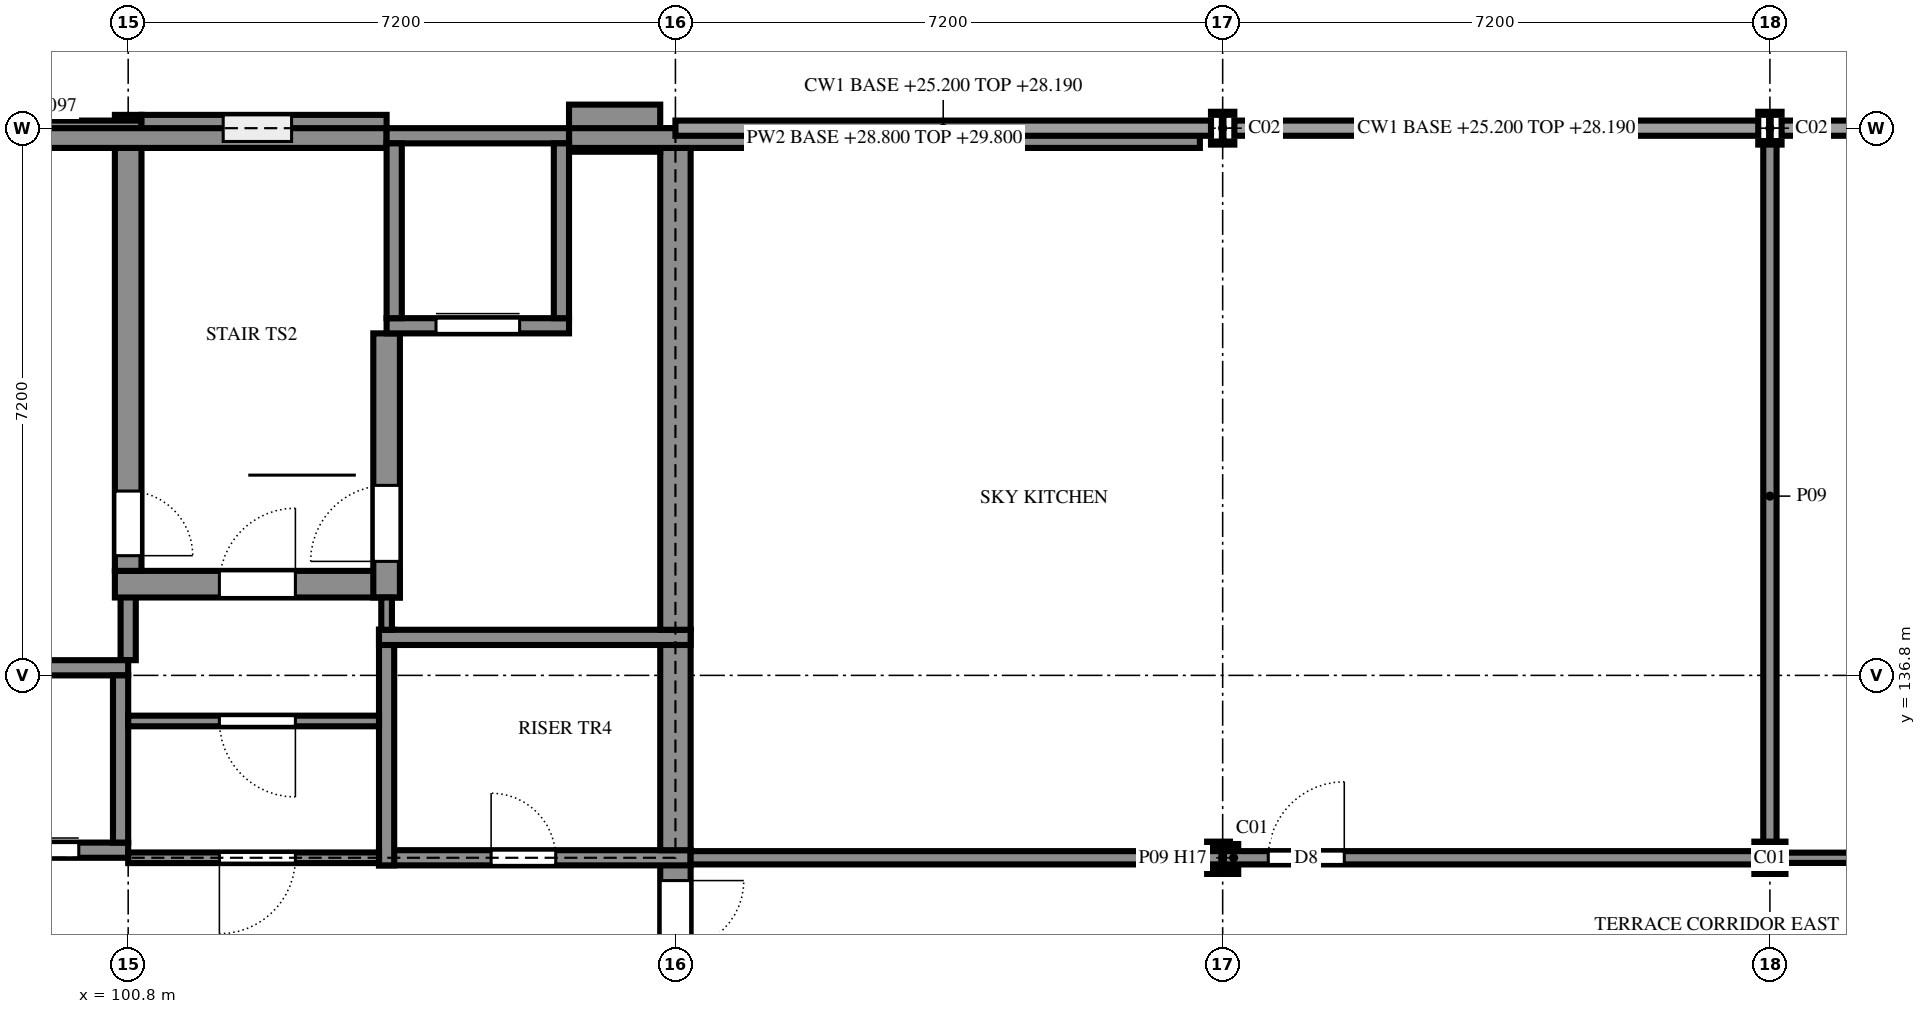
"""IFC4 building model, lengths in metres.
Left out: names, types, materials, properties, quantities, classifications, styles, units other than length and angle.
Written with IfcOpenShell. Run it as: python <this file> out.ifc"""

import sys

from ifc_helpers import new_model, si_unit, direction, frame, frame_2d, origin, origin_2d, place, context, subcontext, project, spatial, rectangle, i_section, extrude, element, fill, save


model = new_model("IFC4")
c1 = context("Model", 3, precision=1e-05, world=origin(), true_north=direction((0.0, 1.0)))
c2 = subcontext(c1, "Body", "Model", "MODEL_VIEW")
j1 = project(units=[si_unit("LENGTHUNIT", "METRE"), si_unit("PLANEANGLEUNIT", "RADIAN")], contexts=[c1])
p1 = place(None, origin())
s1 = spatial("IfcSite", under=j1, at=p1, CompositionType="ELEMENT")
p2 = place(p1, origin())
s2 = spatial("IfcBuilding", under=s1, at=p2, CompositionType="ELEMENT")
p3 = place(p2, frame((0.0, 0.0, 25.2)))
s3 = spatial("IfcBuildingStorey", under=s2, at=p3, CompositionType="ELEMENT", Elevation=25.2)
p4 = place(p3, frame((115.2, 134.4, 0.0), z_axis=(0.0, 0.0, 1.0), x_axis=(1.0, 0.0, 0.0)))
e1 = element("IfcColumn", 1, at=p4, inside=s3, PredefinedType="COLUMN", context=c2, shape_type="SweptSolid", body=[
    extrude(i_section(OverallWidth=0.409, OverallDepth=0.425, WebThickness=0.033, FlangeThickness=0.052, FilletRadius=0.015, at=origin_2d()), origin(), (0.0, 0.0, 1.0), 3.6),
])
p5 = place(p3, frame((115.2, 144.0, 0.0), z_axis=(0.0, 0.0, 1.0), x_axis=(1.0, 0.0, 0.0)))
e2 = element("IfcColumn", 2, at=p5, inside=s3, PredefinedType="COLUMN", context=c2, shape_type="SweptSolid", body=[
    extrude(i_section(OverallWidth=0.307, OverallDepth=0.432, WebThickness=0.021, FlangeThickness=0.04, FilletRadius=0.027, at=origin_2d()), origin(), (0.0, 0.0, 1.0), 3.6),
])
p6 = place(p3, frame((122.4, 134.4, 0.0), z_axis=(0.0, 0.0, 1.0), x_axis=(1.0, 0.0, 0.0)))
e3 = element("IfcColumn", 3, at=p6, inside=s3, PredefinedType="COLUMN", context=c2, shape_type="SweptSolid", body=[
    extrude(i_section(OverallWidth=0.409, OverallDepth=0.425, WebThickness=0.033, FlangeThickness=0.052, FilletRadius=0.015, at=origin_2d()), origin(), (0.0, 0.0, 1.0), 3.6),
])
p7 = place(p3, frame((122.4, 144.0, 0.0), z_axis=(0.0, 0.0, 1.0), x_axis=(1.0, 0.0, 0.0)))
e4 = element("IfcColumn", 4, at=p7, inside=s3, PredefinedType="COLUMN", context=c2, shape_type="SweptSolid", body=[
    extrude(i_section(OverallWidth=0.307, OverallDepth=0.432, WebThickness=0.021, FlangeThickness=0.04, FilletRadius=0.027, at=origin_2d()), origin(), (0.0, 0.0, 1.0), 3.6),
])
p8 = place(p3, frame((108.0, 132.0, 0.0), z_axis=(0.0, 0.0, 1.0), x_axis=(0.0, 1.0, 0.0)))
e5 = element("IfcWall", 5, at=p8, inside=s3, PredefinedType="SHEAR", context=c2, shape_type="SweptSolid", body=[
    extrude(rectangle(XDim=2.5, YDim=0.4, at=frame_2d((1.25, 0.0))), origin(), (0.0, 0.0, 1.0), 3.6),
])
p9 = place(p8, frame((0.3, 0.0, 0.0)))
e6 = element("IfcOpeningElement", 6, at=p9, cuts=e5, PredefinedType="OPENING", context=c2, shape_type="SweptSolid", body=[
    extrude(rectangle(XDim=1.8, YDim=2.1, at=frame_2d((0.9, 1.05))), frame((0.0, 0.21, 0.0), z_axis=(0.0, -1.0, 0.0), x_axis=(1.0, 0.0, 0.0)), (0.0, 0.0, 1.0), 0.42),
])
p10 = place(p3, frame((104.1, 134.4, 0.0), z_axis=(0.0, 0.0, 1.0), x_axis=(1.0, 0.0, 0.0)))
e7 = element("IfcWall", 7, at=p10, inside=s3, PredefinedType="SHEAR", context=c2, shape_type="SweptSolid", body=[
    extrude(rectangle(XDim=4.1, YDim=0.2, at=frame_2d((2.05, 0.0))), origin(), (0.0, 0.0, 1.0), 3.6),
])
p11 = place(p10, frame((1.475, 0.0, 0.0)))
e8 = element("IfcOpeningElement", 8, at=p11, cuts=e7, PredefinedType="OPENING", context=c2, shape_type="SweptSolid", body=[
    extrude(rectangle(XDim=0.85, YDim=2.1, at=frame_2d((0.425, 1.05))), frame((0.0, 0.11, 0.0), z_axis=(0.0, -1.0, 0.0), x_axis=(1.0, 0.0, 0.0)), (0.0, 0.0, 1.0), 0.22),
])
p12 = place(p3, frame((108.0, 134.5, 0.0), z_axis=(0.0, 0.0, 1.0), x_axis=(0.0, 1.0, 0.0)))
e9 = element("IfcWall", 9, at=p12, inside=s3, PredefinedType="SHEAR", context=c2, shape_type="SweptSolid", body=[
    extrude(rectangle(XDim=2.9, YDim=0.4, at=frame_2d((1.45, 0.0))), origin(), (0.0, 0.0, 1.0), 3.6),
])
p13 = place(p3, frame((100.8, 137.0, 0.0), z_axis=(0.0, 0.0, 1.0), x_axis=(0.0, 1.0, 0.0)))
e10 = element("IfcWall", 10, at=p13, inside=s3, PredefinedType="SHEAR", context=c2, shape_type="SweptSolid", body=[
    extrude(rectangle(XDim=1.175, YDim=0.2, at=frame_2d((0.587, 0.0))), origin(), (0.0, 0.0, 1.0), 3.6),
])
p14 = place(p3, frame((104.2, 137.4, 0.0), z_axis=(0.0, 0.0, 1.0), x_axis=(0.0, -1.0, 0.0)))
e11 = element("IfcWall", 11, at=p14, inside=s3, PredefinedType="SHEAR", context=c2, shape_type="SweptSolid", body=[
    extrude(rectangle(XDim=3.1, YDim=0.2, at=frame_2d((1.55, 0.0))), origin(), (0.0, 0.0, 1.0), 3.6),
])
p15 = place(p3, frame((108.2, 137.3, 0.0), z_axis=(0.0, 0.0, 1.0), x_axis=(-1.0, 0.0, 0.0)))
e12 = element("IfcWall", 12, at=p15, inside=s3, PredefinedType="SHEAR", context=c2, shape_type="SweptSolid", body=[
    extrude(rectangle(XDim=4.1, YDim=0.2, at=frame_2d((2.05, 0.0))), origin(), (0.0, 0.0, 1.0), 3.6),
])
p16 = place(p3, frame((108.0, 137.4, 0.0), z_axis=(0.0, 0.0, 1.0), x_axis=(0.0, 1.0, 0.0)))
e13 = element("IfcWall", 13, at=p16, inside=s3, PredefinedType="SHEAR", context=c2, shape_type="SweptSolid", body=[
    extrude(rectangle(XDim=6.6, YDim=0.4, at=frame_2d((3.3, 0.0))), origin(), (0.0, 0.0, 1.0), 3.6),
])
p17 = place(p3, frame((100.625, 138.0, 0.0), z_axis=(0.0, 0.0, 1.0), x_axis=(1.0, 0.0, 0.0)))
e14 = element("IfcWall", 14, at=p17, inside=s3, PredefinedType="SHEAR", context=c2, shape_type="SweptSolid", body=[
    extrude(rectangle(XDim=3.75, YDim=0.35, at=frame_2d((1.875, 0.0))), origin(), (0.0, 0.0, 1.0), 3.6),
])
p18 = place(p17, frame((1.375, 0.0, 0.0)))
e15 = element("IfcOpeningElement", 15, at=p18, cuts=e14, PredefinedType="OPENING", context=c2, shape_type="SweptSolid", body=[
    extrude(rectangle(XDim=1.0, YDim=2.1, at=frame_2d((0.5, 1.05))), frame((0.0, 0.185, 0.0), z_axis=(0.0, -1.0, 0.0), x_axis=(1.0, 0.0, 0.0)), (0.0, 0.0, 1.0), 0.37),
])
p19 = place(p3, frame((104.2, 137.825, 0.0), z_axis=(0.0, 0.0, 1.0), x_axis=(0.0, 1.0, 0.0)))
e16 = element("IfcWall", 16, at=p19, inside=s3, PredefinedType="SHEAR", context=c2, shape_type="SweptSolid", body=[
    extrude(rectangle(XDim=3.475, YDim=0.35, at=frame_2d((1.738, 0.0))), origin(), (0.0, 0.0, 1.0), 3.6),
])
p20 = place(p19, frame((0.475, 0.0, 0.0)))
e17 = element("IfcOpeningElement", 17, at=p20, cuts=e16, PredefinedType="OPENING", context=c2, shape_type="SweptSolid", body=[
    extrude(rectangle(XDim=1.0, YDim=2.1, at=frame_2d((0.5, 1.05))), frame((0.0, 0.185, 0.0), z_axis=(0.0, -1.0, 0.0), x_axis=(1.0, 0.0, 0.0)), (0.0, 0.0, 1.0), 0.37),
])
p21 = place(p3, frame((100.8, 144.175, 0.0), z_axis=(0.0, 0.0, 1.0), x_axis=(0.0, -1.0, 0.0)))
e18 = element("IfcWall", 18, at=p21, inside=s3, PredefinedType="SHEAR", context=c2, shape_type="SweptSolid", body=[
    extrude(rectangle(XDim=6.0, YDim=0.35, at=frame_2d((3.0, 0.0))), origin(), (0.0, 0.0, 1.0), 3.6),
])
p22 = place(p21, frame((4.95, 0.0, 0.0)))
e19 = element("IfcOpeningElement", 19, at=p22, cuts=e18, PredefinedType="OPENING", context=c2, shape_type="SweptSolid", body=[
    extrude(rectangle(XDim=0.85, YDim=2.1, at=frame_2d((0.425, 1.05))), frame((0.0, 0.185, 0.0), z_axis=(0.0, -1.0, 0.0), x_axis=(1.0, 0.0, 0.0)), (0.0, 0.0, 1.0), 0.37),
])
p23 = place(p3, frame((100.975, 144.0, 0.0), z_axis=(0.0, 0.0, 1.0), x_axis=(-1.0, 0.0, 0.0)))
e20 = element("IfcWall", 20, at=p23, inside=s3, PredefinedType="SHEAR", context=c2, shape_type="SweptSolid", body=[
    extrude(rectangle(XDim=7.575, YDim=0.2, at=frame_2d((3.788, 0.0))), origin(), (0.0, 0.0, 1.0), 3.6),
])
p24 = place(p3, frame((104.2, 144.0, 0.0), z_axis=(0.0, 0.0, 1.0), x_axis=(-1.0, 0.0, 0.0)))
e21 = element("IfcWall", 21, at=p24, inside=s3, PredefinedType="SHEAR", context=c2, shape_type="SweptSolid", body=[
    extrude(rectangle(XDim=3.225, YDim=0.35, at=frame_2d((1.612, 0.0))), origin(), (0.0, 0.0, 1.0), 3.6),
])
p25 = place(p24, frame((1.25, 0.0, 0.6)))
e22 = element("IfcOpeningElement", 22, at=p25, cuts=e21, PredefinedType="OPENING", context=c2, shape_type="SweptSolid", body=[
    extrude(rectangle(XDim=0.9, YDim=2.1, at=frame_2d((0.45, 1.05))), frame((0.0, 0.185, 0.0), z_axis=(0.0, -1.0, 0.0), x_axis=(1.0, 0.0, 0.0)), (0.0, 0.0, 1.0), 0.37),
])
p26 = place(p3, frame((107.8, 144.0, 0.0), z_axis=(0.0, 0.0, 1.0), x_axis=(-1.0, 0.0, 0.0)))
e23 = element("IfcWall", 23, at=p26, inside=s3, PredefinedType="SOLIDWALL", context=c2, shape_type="SweptSolid", body=[
    extrude(rectangle(XDim=1.2, YDim=0.62, at=frame_2d((0.6, 0.0))), origin(), (0.0, 0.0, 1.0), 3.29),
])
p27 = place(p3, frame((86.7, 143.87, 3.6), z_axis=(0.0, 0.0, 1.0), x_axis=(1.0, 0.0, 0.0)))
e24 = element("IfcWall", 24, at=p27, inside=s3, PredefinedType="PARAPET", context=c2, shape_type="SweptSolid", body=[
    extrude(rectangle(XDim=17.5, YDim=0.26, at=frame_2d((8.75, 0.0))), origin(), (0.0, 0.0, 1.0), 1.0),
])
p28 = place(p3, frame((106.6, 143.87, 3.6), z_axis=(0.0, 0.0, 1.0), x_axis=(1.0, 0.0, 0.0)))
e25 = element("IfcWall", 25, at=p28, inside=s3, PredefinedType="PARAPET", context=c2, shape_type="SweptSolid", body=[
    extrude(rectangle(XDim=8.3, YDim=0.26, at=frame_2d((4.15, 0.0))), origin(), (0.0, 0.0, 1.0), 1.0),
])
p29 = place(p3, frame((98.4, 134.5, 0.0), z_axis=(0.0, 0.0, 1.0), x_axis=(1.0, 0.0, 0.0)))
e26 = element("IfcWall", 26, at=p29, inside=s3, PredefinedType="SHEAR", context=c2, shape_type="SweptSolid", body=[
    extrude(rectangle(XDim=2.4, YDim=0.2, at=frame_2d((1.2, 0.0))), origin(), (0.0, 0.0, 1.0), 4.5),
])
p30 = place(p29, frame((0.65, 0.0, 0.0)))
e27 = element("IfcOpeningElement", 27, at=p30, cuts=e26, PredefinedType="OPENING", context=c2, shape_type="SweptSolid", body=[
    extrude(rectangle(XDim=1.1, YDim=2.1, at=frame_2d((0.55, 1.05))), frame((0.0, 0.11, 0.0), z_axis=(0.0, -1.0, 0.0), x_axis=(1.0, 0.0, 0.0)), (0.0, 0.0, 1.0), 0.22),
])
p31 = place(p3, frame((98.4, 136.9, 0.0), z_axis=(0.0, 0.0, 1.0), x_axis=(1.0, 0.0, 0.0)))
e28 = element("IfcWall", 28, at=p31, inside=s3, PredefinedType="SHEAR", context=c2, shape_type="SweptSolid", body=[
    extrude(rectangle(XDim=2.4, YDim=0.2, at=frame_2d((1.2, 0.0))), origin(), (0.0, 0.0, 1.0), 4.5),
])
p32 = place(p3, frame((100.7, 134.6, 0.0), z_axis=(0.0, 0.0, 1.0), x_axis=(0.0, 1.0, 0.0)))
e29 = element("IfcWall", 29, at=p32, inside=s3, PredefinedType="SHEAR", context=c2, shape_type="SweptSolid", body=[
    extrude(rectangle(XDim=2.2, YDim=0.2, at=frame_2d((1.1, 0.0))), origin(), (0.0, 0.0, 1.0), 4.5),
])
p33 = place(p3, frame((104.2, 141.4, 0.0), z_axis=(0.0, 0.0, 1.0), x_axis=(1.0, 0.0, 0.0)))
e30 = element("IfcWall", 30, at=p33, inside=s3, PredefinedType="SHEAR", context=c2, shape_type="SweptSolid", body=[
    extrude(rectangle(XDim=2.4, YDim=0.2, at=frame_2d((1.2, 0.0))), origin(), (0.0, 0.0, 1.0), 4.5),
])
p34 = place(p33, frame((0.65, 0.0, 0.0)))
e31 = element("IfcOpeningElement", 31, at=p34, cuts=e30, PredefinedType="OPENING", context=c2, shape_type="SweptSolid", body=[
    extrude(rectangle(XDim=1.1, YDim=2.1, at=frame_2d((0.55, 1.05))), frame((0.0, 0.11, 0.0), z_axis=(0.0, -1.0, 0.0), x_axis=(1.0, 0.0, 0.0)), (0.0, 0.0, 1.0), 0.22),
])
p35 = place(p3, frame((104.2, 143.9, 0.0), z_axis=(0.0, 0.0, 1.0), x_axis=(1.0, 0.0, 0.0)))
e32 = element("IfcWall", 32, at=p35, inside=s3, PredefinedType="SHEAR", context=c2, shape_type="SweptSolid", body=[
    extrude(rectangle(XDim=2.4, YDim=0.2, at=frame_2d((1.2, 0.0))), origin(), (0.0, 0.0, 1.0), 4.5),
])
for number, where, z_axis, x_axis in (
    (33, (104.3, 141.5, 0.0), (0.0, 0.0, 1.0), (0.0, 1.0, 0.0)),
    (34, (106.5, 141.5, 0.0), (0.0, 0.0, 1.0), (0.0, 1.0, 0.0)),
):
    element("IfcWall", number, at=place(p3, frame(where, z_axis=z_axis, x_axis=x_axis)), inside=s3, PredefinedType="SHEAR", context=c2, shape_type="SweptSolid", body=[
        extrude(rectangle(XDim=2.3, YDim=0.2, at=frame_2d((1.15, 0.0))), origin(), (0.0, 0.0, 1.0), 4.5),
    ])
p36 = place(p3, frame((100.8, 134.4, 0.0), z_axis=(0.0, 0.0, 1.0), x_axis=(1.0, 0.0, 0.0)))
e35 = element("IfcWall", 35, at=p36, inside=s3, PredefinedType="PARTITIONING", context=c2, shape_type="SweptSolid", body=[
    extrude(rectangle(XDim=3.3, YDim=0.14, at=frame_2d((1.65, 0.0))), origin(), (0.0, 0.0, 1.0), 3.29),
])
p37 = place(p36, frame((1.2, 0.0, 0.0)))
e36 = element("IfcOpeningElement", 36, at=p37, cuts=e35, PredefinedType="OPENING", context=c2, shape_type="SweptSolid", body=[
    extrude(rectangle(XDim=1.0, YDim=2.1, at=frame_2d((0.5, 1.05))), frame((0.0, 0.08, 0.0), z_axis=(0.0, -1.0, 0.0), x_axis=(1.0, 0.0, 0.0)), (0.0, 0.0, 1.0), 0.16),
])
p38 = place(p3, frame((108.2, 134.4, 0.0), z_axis=(0.0, 0.0, 1.0), x_axis=(1.0, 0.0, 0.0)))
e37 = element("IfcWall", 37, at=p38, inside=s3, PredefinedType="PARTITIONING", context=c2, shape_type="SweptSolid", body=[
    extrude(rectangle(XDim=14.288, YDim=0.175, at=frame_2d((7.144, 0.0))), origin(), (0.0, 0.0, 1.0), 2.99),
])
p39 = place(p38, frame((7.6, 0.0, 0.0)))
e38 = element("IfcOpeningElement", 38, at=p39, cuts=e37, PredefinedType="OPENING", context=c2, shape_type="SweptSolid", body=[
    extrude(rectangle(XDim=1.0, YDim=2.4, at=frame_2d((0.5, 1.2))), frame((0.0, 0.097, 0.0), z_axis=(0.0, -1.0, 0.0), x_axis=(1.0, 0.0, 0.0)), (0.0, 0.0, 1.0), 0.195),
])
p40 = place(p3, frame((122.312, 134.4, 0.0), z_axis=(0.0, 0.0, 1.0), x_axis=(1.0, 0.0, 0.0)))
e39 = element("IfcWall", 39, at=p40, inside=s3, PredefinedType="PARTITIONING", context=c2, shape_type="SweptSolid", body=[
    extrude(rectangle(XDim=10.958, YDim=0.135, at=frame_2d((5.479, 0.0))), origin(), (0.0, 0.0, 1.0), 2.99),
])
p41 = place(p40, frame((2.288, 0.0, 0.0)))
e40 = element("IfcOpeningElement", 40, at=p41, cuts=e39, PredefinedType="OPENING", context=c2, shape_type="SweptSolid", body=[
    extrude(rectangle(XDim=1.0, YDim=2.4, at=frame_2d((0.5, 1.2))), frame((0.0, 0.077, 0.0), z_axis=(0.0, -1.0, 0.0), x_axis=(1.0, 0.0, 0.0)), (0.0, 0.0, 1.0), 0.155),
])
p42 = place(p40, frame((7.887, 0.0, 0.0)))
e41 = element("IfcOpeningElement", 41, at=p42, cuts=e39, PredefinedType="OPENING", context=c2, shape_type="SweptSolid", body=[
    extrude(rectangle(XDim=1.0, YDim=2.4, at=frame_2d((0.5, 1.2))), frame((0.0, 0.077, 0.0), z_axis=(0.0, -1.0, 0.0), x_axis=(1.0, 0.0, 0.0)), (0.0, 0.0, 1.0), 0.155),
])
p43 = place(p3, frame((100.8, 136.2, 0.0), z_axis=(0.0, 0.0, 1.0), x_axis=(1.0, 0.0, 0.0)))
e42 = element("IfcWall", 42, at=p43, inside=s3, PredefinedType="PARTITIONING", context=c2, shape_type="SweptSolid", body=[
    extrude(rectangle(XDim=3.3, YDim=0.14, at=frame_2d((1.65, 0.0))), origin(), (0.0, 0.0, 1.0), 3.29),
])
p44 = place(p43, frame((1.2, 0.0, 0.0)))
e43 = element("IfcOpeningElement", 43, at=p44, cuts=e42, PredefinedType="OPENING", context=c2, shape_type="SweptSolid", body=[
    extrude(rectangle(XDim=1.0, YDim=2.1, at=frame_2d((0.5, 1.05))), frame((0.0, 0.08, 0.0), z_axis=(0.0, -1.0, 0.0), x_axis=(1.0, 0.0, 0.0)), (0.0, 0.0, 1.0), 0.16),
])
p45 = place(p3, frame((104.2, 137.4, 0.0), z_axis=(0.0, 0.0, 1.0), x_axis=(0.0, 1.0, 0.0)))
e44 = element("IfcWall", 44, at=p45, inside=s3, PredefinedType="PARTITIONING", context=c2, shape_type="SweptSolid", body=[
    extrude(rectangle(XDim=0.425, YDim=0.14, at=frame_2d((0.212, 0.0))), origin(), (0.0, 0.0, 1.0), 3.29),
])
p46 = place(p3, frame((122.4, 134.488, 0.0), z_axis=(0.0, 0.0, 1.0), x_axis=(0.0, 1.0, 0.0)))
e45 = element("IfcWall", 45, at=p46, inside=s3, PredefinedType="PARTITIONING", context=c2, shape_type="SweptSolid", body=[
    extrude(rectangle(XDim=9.343, YDim=0.175, at=frame_2d((4.671, 0.0))), origin(), (0.0, 0.0, 1.0), 2.89),
])
p47 = place(p25, origin())
e46 = element("IfcWindow", 46, at=p47, inside=s3, PartitioningType="SINGLE_PANEL", PredefinedType="WINDOW", context=c2, shape_type="SweptSolid", body=[
    extrude(rectangle(XDim=0.9, YDim=2.1, at=frame_2d((0.45, 1.05))), frame((0.0, 0.03, 0.0), z_axis=(0.0, -1.0, 0.0), x_axis=(1.0, 0.0, 0.0)), (0.0, 0.0, 1.0), 0.06),
])
fill(e22, e46)
p48 = place(p30, origin())
e47 = element("IfcDoor", 47, at=p48, inside=s3, OperationType="SLIDING_TO_LEFT", PredefinedType="DOOR", context=c2, shape_type="SweptSolid", body=[
    extrude(rectangle(XDim=1.1, YDim=2.1, at=frame_2d((0.55, 1.05))), frame((0.0, 0.025, 0.0), z_axis=(0.0, -1.0, 0.0), x_axis=(1.0, 0.0, 0.0)), (0.0, 0.0, 1.0), 0.05),
])
fill(e27, e47)
p49 = place(p34, origin())
e48 = element("IfcDoor", 48, at=p49, inside=s3, OperationType="SLIDING_TO_LEFT", PredefinedType="DOOR", context=c2, shape_type="SweptSolid", body=[
    extrude(rectangle(XDim=1.1, YDim=2.1, at=frame_2d((0.55, 1.05))), frame((0.0, 0.025, 0.0), z_axis=(0.0, -1.0, 0.0), x_axis=(1.0, 0.0, 0.0)), (0.0, 0.0, 1.0), 0.05),
])
fill(e31, e48)
p50 = place(p37, frame((1.0, 0.0, 0.0), z_axis=(0.0, 0.0, 1.0), x_axis=(-1.0, 0.0, 0.0)))
e49 = element("IfcDoor", 49, at=p50, inside=s3, OperationType="SINGLE_SWING_LEFT", PredefinedType="DOOR", context=c2, shape_type="SweptSolid", body=[
    extrude(rectangle(XDim=1.0, YDim=2.1, at=frame_2d((0.5, 1.05))), frame((0.0, 0.025, 0.0), z_axis=(0.0, -1.0, 0.0), x_axis=(1.0, 0.0, 0.0)), (0.0, 0.0, 1.0), 0.05),
])
fill(e36, e49)
p51 = place(p39, origin())
e50 = element("IfcDoor", 50, at=p51, inside=s3, OperationType="SINGLE_SWING_LEFT", PredefinedType="DOOR", context=c2, shape_type="SweptSolid", body=[
    extrude(rectangle(XDim=1.0, YDim=2.4, at=frame_2d((0.5, 1.2))), frame((0.0, 0.025, 0.0), z_axis=(0.0, -1.0, 0.0), x_axis=(1.0, 0.0, 0.0)), (0.0, 0.0, 1.0), 0.05),
])
fill(e38, e50)
p52 = place(p44, frame((1.0, 0.0, 0.0), z_axis=(0.0, 0.0, 1.0), x_axis=(-1.0, 0.0, 0.0)))
e51 = element("IfcDoor", 51, at=p52, inside=s3, OperationType="SINGLE_SWING_RIGHT", PredefinedType="DOOR", context=c2, shape_type="SweptSolid", body=[
    extrude(rectangle(XDim=1.0, YDim=2.1, at=frame_2d((0.5, 1.05))), frame((0.0, 0.025, 0.0), z_axis=(0.0, -1.0, 0.0), x_axis=(1.0, 0.0, 0.0)), (0.0, 0.0, 1.0), 0.05),
])
fill(e43, e51)
p53 = place(p11, origin())
e52 = element("IfcDoor", 52, at=p53, inside=s3, OperationType="SINGLE_SWING_RIGHT", PredefinedType="DOOR", context=c2, shape_type="SweptSolid", body=[
    extrude(rectangle(XDim=0.85, YDim=2.1, at=frame_2d((0.425, 1.05))), frame((0.0, 0.025, 0.0), z_axis=(0.0, -1.0, 0.0), x_axis=(1.0, 0.0, 0.0)), (0.0, 0.0, 1.0), 0.05),
])
fill(e8, e52)
p54 = place(p18, origin())
e53 = element("IfcDoor", 53, at=p54, inside=s3, OperationType="SINGLE_SWING_LEFT", PredefinedType="DOOR", context=c2, shape_type="SweptSolid", body=[
    extrude(rectangle(XDim=1.0, YDim=2.1, at=frame_2d((0.5, 1.05))), frame((0.0, 0.025, 0.0), z_axis=(0.0, -1.0, 0.0), x_axis=(1.0, 0.0, 0.0)), (0.0, 0.0, 1.0), 0.05),
])
fill(e15, e53)
p55 = place(p22, origin())
e54 = element("IfcDoor", 54, at=p55, inside=s3, OperationType="SINGLE_SWING_LEFT", PredefinedType="DOOR", context=c2, shape_type="SweptSolid", body=[
    extrude(rectangle(XDim=0.85, YDim=2.1, at=frame_2d((0.425, 1.05))), frame((0.0, 0.025, 0.0), z_axis=(0.0, -1.0, 0.0), x_axis=(1.0, 0.0, 0.0)), (0.0, 0.0, 1.0), 0.05),
])
fill(e19, e54)
p56 = place(p20, origin())
e55 = element("IfcDoor", 55, at=p56, inside=s3, OperationType="SINGLE_SWING_RIGHT", PredefinedType="DOOR", context=c2, shape_type="SweptSolid", body=[
    extrude(rectangle(XDim=1.0, YDim=2.1, at=frame_2d((0.5, 1.05))), frame((0.0, 0.025, 0.0), z_axis=(0.0, -1.0, 0.0), x_axis=(1.0, 0.0, 0.0)), (0.0, 0.0, 1.0), 0.05),
])
fill(e17, e55)
p57 = place(p9, frame((1.8, 0.0, 0.0), z_axis=(0.0, 0.0, 1.0), x_axis=(-1.0, 0.0, 0.0)))
e56 = element("IfcDoor", 56, at=p57, inside=s3, OperationType="DOUBLE_DOOR_SINGLE_SWING", PredefinedType="DOOR", context=c2, shape_type="SweptSolid", body=[
    extrude(rectangle(XDim=1.8, YDim=2.1, at=frame_2d((0.9, 1.05))), frame((0.0, 0.025, 0.0), z_axis=(0.0, -1.0, 0.0), x_axis=(1.0, 0.0, 0.0)), (0.0, 0.0, 1.0), 0.05),
])
fill(e6, e56)
save(model, sys.argv[1])
